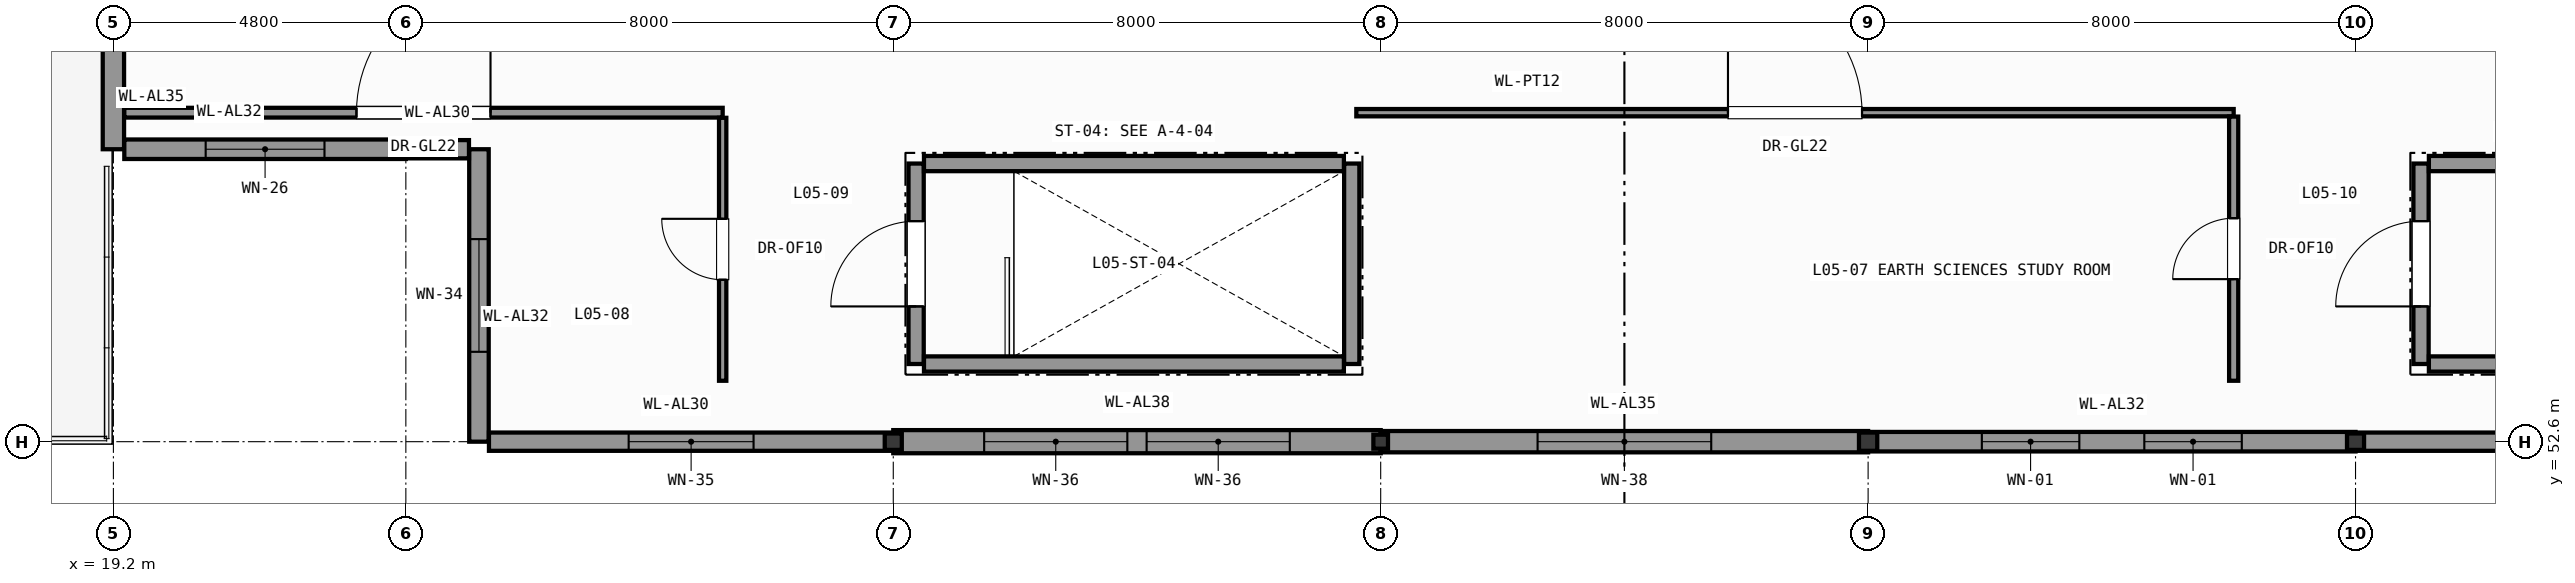
"""IFC4 building model, lengths in metres.
Left out: names, types, materials, properties, quantities, classifications, styles, units other than length and angle.
Written with IfcOpenShell. Run it as: python <this file> out.ifc"""

import sys

from ifc_helpers import new_model, si_unit, direction, frame, frame_2d, origin, origin_2d, place, context, subcontext, project, spatial, rectangle, i_section, extrude, element, fill, save


model = new_model("IFC4")
c1 = context("Model", 3, precision=1e-05, world=origin(), true_north=direction((0.0, 1.0)))
c2 = subcontext(c1, "Body", "Model", "MODEL_VIEW")
j1 = project(units=[si_unit("LENGTHUNIT", "METRE"), si_unit("PLANEANGLEUNIT", "RADIAN")], contexts=[c1])
p1 = place(None, origin())
s1 = spatial("IfcSite", under=j1, at=p1, CompositionType="ELEMENT")
p2 = place(p1, origin())
s2 = spatial("IfcBuilding", under=s1, at=p2, CompositionType="ELEMENT")
p3 = place(p2, frame((0.0, 0.0, 22.2)))
s3 = spatial("IfcBuildingStorey", under=s2, at=p3, CompositionType="ELEMENT", Elevation=22.2)
p4 = place(p3, frame((32.0, 52.6, 0.0), z_axis=(0.0, 0.0, 1.0), x_axis=(1.0, 0.0, 0.0)))
e1 = element("IfcColumn", 1, at=p4, inside=s3, PredefinedType="COLUMN", context=c2, shape_type="SweptSolid", body=[
    extrude(i_section(OverallWidth=0.28, OverallDepth=0.27, WebThickness=0.008, FlangeThickness=0.013, FilletRadius=0.024, at=origin_2d()), origin(), (0.0, 0.0, 1.0), 4.2),
])
p5 = place(p3, frame((40.0, 52.6, 0.0), z_axis=(0.0, 0.0, 1.0), x_axis=(1.0, 0.0, 0.0)))
e2 = element("IfcColumn", 2, at=p5, inside=s3, PredefinedType="COLUMN", context=c2, shape_type="SweptSolid", body=[
    extrude(i_section(OverallWidth=0.24, OverallDepth=0.23, WebThickness=0.008, FlangeThickness=0.012, FilletRadius=0.021, at=origin_2d()), origin(), (0.0, 0.0, 1.0), 4.2),
])
p6 = place(p3, frame((48.0, 52.6, 0.0), z_axis=(0.0, 0.0, 1.0), x_axis=(1.0, 0.0, 0.0)))
e3 = element("IfcColumn", 3, at=p6, inside=s3, PredefinedType="COLUMN", context=c2, shape_type="SweptSolid", body=[
    extrude(i_section(OverallWidth=0.3, OverallDepth=0.3, WebThickness=0.011, FlangeThickness=0.019, FilletRadius=0.027, at=origin_2d()), origin(), (0.0, 0.0, 1.0), 4.2),
])
p7 = place(p3, frame((56.0, 52.6, 0.0), z_axis=(0.0, 0.0, 1.0), x_axis=(1.0, 0.0, 0.0)))
e4 = element("IfcColumn", 4, at=p7, inside=s3, PredefinedType="COLUMN", context=c2, shape_type="SweptSolid", body=[
    extrude(i_section(OverallWidth=0.28, OverallDepth=0.27, WebThickness=0.008, FlangeThickness=0.013, FilletRadius=0.024, at=origin_2d()), origin(), (0.0, 0.0, 1.0), 4.2),
])
p8 = place(p3, frame((25.2, 52.6, 0.0), z_axis=(0.0, 0.0, 1.0), x_axis=(0.0, 1.0, 0.0)))
e5 = element("IfcWall", 5, at=p8, inside=s3, PredefinedType="SOLIDWALL", context=c2, shape_type="SweptSolid", body=[
    extrude(rectangle(XDim=4.8, YDim=0.32, at=frame_2d((2.4, 0.0))), origin(), (0.0, 0.0, 1.0), 3.98),
])
p9 = place(p8, frame((1.475, 0.0, 0.95)))
e6 = element("IfcOpeningElement", 6, at=p9, cuts=e5, PredefinedType="OPENING", context=c2, shape_type="SweptSolid", body=[
    extrude(rectangle(XDim=1.85, YDim=2.63, at=frame_2d((0.925, 1.315))), frame((0.0, 0.17, 0.0), z_axis=(0.0, -1.0, 0.0), x_axis=(1.0, 0.0, 0.0)), (0.0, 0.0, 1.0), 0.34),
])
p10 = place(p3, frame((32.0, 52.6, 0.0), z_axis=(0.0, 0.0, 1.0), x_axis=(-1.0, 0.0, 0.0)))
e7 = element("IfcWall", 7, at=p10, inside=s3, PredefinedType="SOLIDWALL", context=c2, shape_type="SweptSolid", body=[
    extrude(rectangle(XDim=6.636, YDim=0.3, at=frame_2d((3.318, 0.0))), origin(), (0.0, 0.0, 1.0), 3.98),
])
p11 = place(p10, frame((2.293, 0.0, 0.95)))
e8 = element("IfcOpeningElement", 8, at=p11, cuts=e7, PredefinedType="OPENING", context=c2, shape_type="SweptSolid", body=[
    extrude(rectangle(XDim=2.05, YDim=2.63, at=frame_2d((1.025, 1.315))), frame((0.0, 0.16, 0.0), z_axis=(0.0, -1.0, 0.0), x_axis=(1.0, 0.0, 0.0)), (0.0, 0.0, 1.0), 0.32),
])
p12 = place(p3, frame((40.0, 52.6, 0.0), z_axis=(0.0, 0.0, 1.0), x_axis=(-1.0, 0.0, 0.0)))
e9 = element("IfcWall", 9, at=p12, inside=s3, PredefinedType="SOLIDWALL", context=c2, shape_type="SweptSolid", body=[
    extrude(rectangle(XDim=8.0, YDim=0.38, at=frame_2d((4.0, 0.0))), origin(), (0.0, 0.0, 1.0), 3.755),
])
p13 = place(p12, frame((1.492, 0.0, 0.95)))
e10 = element("IfcOpeningElement", 10, at=p13, cuts=e9, PredefinedType="OPENING", context=c2, shape_type="SweptSolid", body=[
    extrude(rectangle(XDim=2.35, YDim=2.4, at=frame_2d((1.175, 1.2))), frame((0.0, 0.2, 0.0), z_axis=(0.0, -1.0, 0.0), x_axis=(1.0, 0.0, 0.0)), (0.0, 0.0, 1.0), 0.4),
])
p14 = place(p12, frame((4.158, 0.0, 0.95)))
e11 = element("IfcOpeningElement", 11, at=p14, cuts=e9, PredefinedType="OPENING", context=c2, shape_type="SweptSolid", body=[
    extrude(rectangle(XDim=2.35, YDim=2.4, at=frame_2d((1.175, 1.2))), frame((0.0, 0.2, 0.0), z_axis=(0.0, -1.0, 0.0), x_axis=(1.0, 0.0, 0.0)), (0.0, 0.0, 1.0), 0.4),
])
p15 = place(p3, frame((48.0, 52.6, 0.0), z_axis=(0.0, 0.0, 1.0), x_axis=(-1.0, 0.0, 0.0)))
e12 = element("IfcWall", 12, at=p15, inside=s3, PredefinedType="SOLIDWALL", context=c2, shape_type="SweptSolid", body=[
    extrude(rectangle(XDim=8.0, YDim=0.35, at=frame_2d((4.0, 0.0))), origin(), (0.0, 0.0, 1.0), 3.685),
])
p16 = place(p15, frame((2.575, 0.0, 0.95)))
e13 = element("IfcOpeningElement", 13, at=p16, cuts=e12, PredefinedType="OPENING", context=c2, shape_type="SweptSolid", body=[
    extrude(rectangle(XDim=2.85, YDim=2.34, at=frame_2d((1.425, 1.17))), frame((0.0, 0.185, 0.0), z_axis=(0.0, -1.0, 0.0), x_axis=(1.0, 0.0, 0.0)), (0.0, 0.0, 1.0), 0.37),
])
p17 = place(p3, frame((56.0, 52.6, 0.0), z_axis=(0.0, 0.0, 1.0), x_axis=(-1.0, 0.0, 0.0)))
e14 = element("IfcWall", 14, at=p17, inside=s3, PredefinedType="SOLIDWALL", context=c2, shape_type="SweptSolid", body=[
    extrude(rectangle(XDim=8.0, YDim=0.32, at=frame_2d((4.0, 0.0))), origin(), (0.0, 0.0, 1.0), 3.625),
])
p18 = place(p17, frame((1.867, 0.0, 0.95)))
e15 = element("IfcOpeningElement", 15, at=p18, cuts=e14, PredefinedType="OPENING", context=c2, shape_type="SweptSolid", body=[
    extrude(rectangle(XDim=1.6, YDim=2.27, at=frame_2d((0.8, 1.135))), frame((0.0, 0.17, 0.0), z_axis=(0.0, -1.0, 0.0), x_axis=(1.0, 0.0, 0.0)), (0.0, 0.0, 1.0), 0.34),
])
p19 = place(p17, frame((4.533, 0.0, 0.95)))
e16 = element("IfcOpeningElement", 16, at=p19, cuts=e14, PredefinedType="OPENING", context=c2, shape_type="SweptSolid", body=[
    extrude(rectangle(XDim=1.6, YDim=2.27, at=frame_2d((0.8, 1.135))), frame((0.0, 0.17, 0.0), z_axis=(0.0, -1.0, 0.0), x_axis=(1.0, 0.0, 0.0)), (0.0, 0.0, 1.0), 0.34),
])
p20 = place(p3, frame((70.0, 52.6, 0.0), z_axis=(0.0, 0.0, 1.0), x_axis=(-1.0, 0.0, 0.0)))
e17 = element("IfcWall", 17, at=p20, inside=s3, PredefinedType="SOLIDWALL", context=c2, shape_type="SweptSolid", body=[
    extrude(rectangle(XDim=14.0, YDim=0.3, at=frame_2d((7.0, 0.0))), origin(), (0.0, 0.0, 1.0), 3.98),
])
p21 = place(p20, frame((3.667, 0.0, 0.95)))
e18 = element("IfcOpeningElement", 18, at=p21, cuts=e17, PredefinedType="OPENING", context=c2, shape_type="SweptSolid", body=[
    extrude(rectangle(XDim=2.0, YDim=2.63, at=frame_2d((1.0, 1.315))), frame((0.0, 0.16, 0.0), z_axis=(0.0, -1.0, 0.0), x_axis=(1.0, 0.0, 0.0)), (0.0, 0.0, 1.0), 0.32),
])
p22 = place(p20, frame((8.333, 0.0, 0.95)))
e19 = element("IfcOpeningElement", 19, at=p22, cuts=e17, PredefinedType="OPENING", context=c2, shape_type="SweptSolid", body=[
    extrude(rectangle(XDim=2.0, YDim=2.63, at=frame_2d((1.0, 1.315))), frame((0.0, 0.16, 0.0), z_axis=(0.0, -1.0, 0.0), x_axis=(1.0, 0.0, 0.0)), (0.0, 0.0, 1.0), 0.32),
])
p23 = place(p3, frame((19.2, 57.4, 0.0), z_axis=(0.0, 0.0, 1.0), x_axis=(0.0, 1.0, 0.0)))
e20 = element("IfcWall", 20, at=p23, inside=s3, PredefinedType="SOLIDWALL", context=c2, shape_type="SweptSolid", body=[
    extrude(rectangle(XDim=2.2, YDim=0.35, at=frame_2d((1.1, 0.0))), origin(), (0.0, 0.0, 1.0), 3.98),
])
p24 = place(p3, frame((24.0, 57.4, 0.0), z_axis=(0.0, 0.0, 1.0), x_axis=(-1.0, 0.0, 0.0)))
e21 = element("IfcWall", 21, at=p24, inside=s3, PredefinedType="SOLIDWALL", context=c2, shape_type="SweptSolid", body=[
    extrude(rectangle(XDim=4.621, YDim=0.32, at=frame_2d((2.311, 0.0))), origin(), (0.0, 0.0, 1.0), 3.98),
])
p25 = place(p24, frame((1.335, 0.0, 0.95)))
e22 = element("IfcOpeningElement", 22, at=p25, cuts=e21, PredefinedType="OPENING", context=c2, shape_type="SweptSolid", body=[
    extrude(rectangle(XDim=1.95, YDim=2.55, at=frame_2d((0.975, 1.275))), frame((0.0, 0.17, 0.0), z_axis=(0.0, -1.0, 0.0), x_axis=(1.0, 0.0, 0.0)), (0.0, 0.0, 1.0), 0.34),
])
p26 = place(p3, frame((25.036, 57.4, 0.0), z_axis=(0.0, 0.0, 1.0), x_axis=(-1.0, 0.0, 0.0)))
e23 = element("IfcWall", 23, at=p26, inside=s3, PredefinedType="SOLIDWALL", context=c2, shape_type="SweptSolid", body=[
    extrude(rectangle(XDim=1.036, YDim=0.3, at=frame_2d((0.518, 0.0))), origin(), (0.0, 0.0, 1.0), 3.98),
])
p27 = place(p3, frame((57.075, 53.875, 0.0), z_axis=(0.0, 0.0, 1.0), x_axis=(0.0, 1.0, 0.0)))
e24 = element("IfcWall", 24, at=p27, inside=s3, PredefinedType="SHEAR", context=c2, shape_type="SweptSolid", body=[
    extrude(rectangle(XDim=3.29, YDim=0.25, at=frame_2d((1.645, 0.0))), origin(), (0.0, 0.0, 1.0), 3.98),
])
p28 = place(p27, frame((0.945, 0.0, 0.0)))
e25 = element("IfcOpeningElement", 25, at=p28, cuts=e24, PredefinedType="OPENING", context=c2, shape_type="SweptSolid", body=[
    extrude(rectangle(XDim=1.4, YDim=2.2, at=frame_2d((0.7, 1.1))), frame((0.0, 0.135, 0.0), z_axis=(0.0, -1.0, 0.0), x_axis=(1.0, 0.0, 0.0)), (0.0, 0.0, 1.0), 0.27),
])
for number, where, z_axis, x_axis in (
    (26, (57.204, 53.875, 0.0), (0.0, 0.0, 1.0), (1.0, 0.0, 0.0)),
    (27, (57.204, 57.165, 0.0), (0.0, 0.0, 1.0), (1.0, 0.0, 0.0)),
):
    element("IfcWall", number, at=place(p3, frame(where, z_axis=z_axis, x_axis=x_axis)), inside=s3, PredefinedType="SHEAR", context=c2, shape_type="SweptSolid", body=[
        extrude(rectangle(XDim=7.192, YDim=0.25, at=frame_2d((3.596, 0.0))), origin(), (0.0, 0.0, 1.0), 3.98),
    ])
p29 = place(p3, frame((32.375, 53.875, 0.0), z_axis=(0.0, 0.0, 1.0), x_axis=(0.0, 1.0, 0.0)))
e28 = element("IfcWall", 28, at=p29, inside=s3, PredefinedType="SHEAR", context=c2, shape_type="SweptSolid", body=[
    extrude(rectangle(XDim=3.29, YDim=0.25, at=frame_2d((1.645, 0.0))), origin(), (0.0, 0.0, 1.0), 3.98),
])
p30 = place(p29, frame((0.945, 0.0, 0.0)))
e29 = element("IfcOpeningElement", 29, at=p30, cuts=e28, PredefinedType="OPENING", context=c2, shape_type="SweptSolid", body=[
    extrude(rectangle(XDim=1.4, YDim=2.2, at=frame_2d((0.7, 1.1))), frame((0.0, 0.135, 0.0), z_axis=(0.0, -1.0, 0.0), x_axis=(1.0, 0.0, 0.0)), (0.0, 0.0, 1.0), 0.27),
])
p31 = place(p3, frame((39.525, 53.875, 0.0), z_axis=(0.0, 0.0, 1.0), x_axis=(0.0, 1.0, 0.0)))
e30 = element("IfcWall", 30, at=p31, inside=s3, PredefinedType="SHEAR", context=c2, shape_type="SweptSolid", body=[
    extrude(rectangle(XDim=3.29, YDim=0.25, at=frame_2d((1.645, 0.0))), origin(), (0.0, 0.0, 1.0), 3.98),
])
for number, where, z_axis, x_axis in (
    (31, (32.504, 53.875, 0.0), (0.0, 0.0, 1.0), (1.0, 0.0, 0.0)),
    (32, (32.504, 57.165, 0.0), (0.0, 0.0, 1.0), (1.0, 0.0, 0.0)),
):
    element("IfcWall", number, at=place(p3, frame(where, z_axis=z_axis, x_axis=x_axis)), inside=s3, PredefinedType="SHEAR", context=c2, shape_type="SweptSolid", body=[
        extrude(rectangle(XDim=6.892, YDim=0.25, at=frame_2d((3.446, 0.0))), origin(), (0.0, 0.0, 1.0), 3.98),
    ])
p32 = place(p3, frame((39.6, 58.0, 0.0), z_axis=(0.0, 0.0, 1.0), x_axis=(1.0, 0.0, 0.0)))
e33 = element("IfcWall", 33, at=p32, inside=s3, PredefinedType="PARTITIONING", context=c2, shape_type="SweptSolid", body=[
    extrude(rectangle(XDim=14.4, YDim=0.12, at=frame_2d((7.2, 0.0))), origin(), (0.0, 0.0, 1.0), 3.98),
])
p33 = place(p32, frame((6.1, 0.0, 0.0)))
e34 = element("IfcOpeningElement", 34, at=p33, cuts=e33, PredefinedType="OPENING", context=c2, shape_type="SweptSolid", body=[
    extrude(rectangle(XDim=2.2, YDim=2.6, at=frame_2d((1.1, 1.3))), frame((0.0, 0.07, 0.0), z_axis=(0.0, -1.0, 0.0), x_axis=(1.0, 0.0, 0.0)), (0.0, 0.0, 1.0), 0.14),
])
p34 = place(p3, frame((19.379, 58.0, 0.0), z_axis=(0.0, 0.0, 1.0), x_axis=(1.0, 0.0, 0.0)))
e35 = element("IfcWall", 35, at=p34, inside=s3, PredefinedType="PARTITIONING", context=c2, shape_type="SweptSolid", body=[
    extrude(rectangle(XDim=9.821, YDim=0.16, at=frame_2d((4.911, 0.0))), origin(), (0.0, 0.0, 1.0), 3.98),
])
p35 = place(p34, frame((3.811, 0.0, 0.0)))
e36 = element("IfcOpeningElement", 36, at=p35, cuts=e35, PredefinedType="OPENING", context=c2, shape_type="SweptSolid", body=[
    extrude(rectangle(XDim=2.2, YDim=2.6, at=frame_2d((1.1, 1.3))), frame((0.0, 0.09, 0.0), z_axis=(0.0, -1.0, 0.0), x_axis=(1.0, 0.0, 0.0)), (0.0, 0.0, 1.0), 0.18),
])
p36 = place(p3, frame((54.0, 53.6, 0.0), z_axis=(0.0, 0.0, 1.0), x_axis=(0.0, 1.0, 0.0)))
e37 = element("IfcWall", 37, at=p36, inside=s3, PredefinedType="PARTITIONING", context=c2, shape_type="SweptSolid", body=[
    extrude(rectangle(XDim=4.336, YDim=0.15, at=frame_2d((2.168, 0.0))), origin(), (0.0, 0.0, 1.0), 3.98),
])
p37 = place(p36, frame((1.668, 0.0, 0.0)))
e38 = element("IfcOpeningElement", 38, at=p37, cuts=e37, PredefinedType="OPENING", context=c2, shape_type="SweptSolid", body=[
    extrude(rectangle(XDim=1.0, YDim=2.15, at=frame_2d((0.5, 1.075))), frame((0.0, 0.085, 0.0), z_axis=(0.0, -1.0, 0.0), x_axis=(1.0, 0.0, 0.0)), (0.0, 0.0, 1.0), 0.17),
])
p38 = place(p3, frame((29.2, 53.6, 0.0), z_axis=(0.0, 0.0, 1.0), x_axis=(0.0, 1.0, 0.0)))
e39 = element("IfcWall", 39, at=p38, inside=s3, PredefinedType="PARTITIONING", context=c2, shape_type="SweptSolid", body=[
    extrude(rectangle(XDim=4.316, YDim=0.12, at=frame_2d((2.158, 0.0))), origin(), (0.0, 0.0, 1.0), 3.98),
])
p39 = place(p38, frame((1.658, 0.0, 0.0)))
e40 = element("IfcOpeningElement", 40, at=p39, cuts=e39, PredefinedType="OPENING", context=c2, shape_type="SweptSolid", body=[
    extrude(rectangle(XDim=1.0, YDim=2.15, at=frame_2d((0.5, 1.075))), frame((0.0, 0.07, 0.0), z_axis=(0.0, -1.0, 0.0), x_axis=(1.0, 0.0, 0.0)), (0.0, 0.0, 1.0), 0.14),
])
p40 = place(p9, origin())
e41 = element("IfcWindow", 41, at=p40, inside=s3, PartitioningType="SINGLE_PANEL", PredefinedType="WINDOW", context=c2, shape_type="SweptSolid", body=[
    extrude(rectangle(XDim=1.85, YDim=2.63, at=frame_2d((0.925, 1.315))), frame((0.0, 0.03, 0.0), z_axis=(0.0, -1.0, 0.0), x_axis=(1.0, 0.0, 0.0)), (0.0, 0.0, 1.0), 0.06),
])
fill(e6, e41)
p41 = place(p11, origin())
e42 = element("IfcWindow", 42, at=p41, inside=s3, PartitioningType="SINGLE_PANEL", PredefinedType="WINDOW", context=c2, shape_type="SweptSolid", body=[
    extrude(rectangle(XDim=2.05, YDim=2.63, at=frame_2d((1.025, 1.315))), frame((0.0, 0.03, 0.0), z_axis=(0.0, -1.0, 0.0), x_axis=(1.0, 0.0, 0.0)), (0.0, 0.0, 1.0), 0.06),
])
fill(e8, e42)
p42 = place(p13, origin())
e43 = element("IfcWindow", 43, at=p42, inside=s3, PartitioningType="SINGLE_PANEL", PredefinedType="WINDOW", context=c2, shape_type="SweptSolid", body=[
    extrude(rectangle(XDim=2.35, YDim=2.4, at=frame_2d((1.175, 1.2))), frame((0.0, 0.03, 0.0), z_axis=(0.0, -1.0, 0.0), x_axis=(1.0, 0.0, 0.0)), (0.0, 0.0, 1.0), 0.06),
])
fill(e10, e43)
p43 = place(p14, origin())
e44 = element("IfcWindow", 44, at=p43, inside=s3, PartitioningType="SINGLE_PANEL", PredefinedType="WINDOW", context=c2, shape_type="SweptSolid", body=[
    extrude(rectangle(XDim=2.35, YDim=2.4, at=frame_2d((1.175, 1.2))), frame((0.0, 0.03, 0.0), z_axis=(0.0, -1.0, 0.0), x_axis=(1.0, 0.0, 0.0)), (0.0, 0.0, 1.0), 0.06),
])
fill(e11, e44)
p44 = place(p16, origin())
e45 = element("IfcWindow", 45, at=p44, inside=s3, PartitioningType="SINGLE_PANEL", PredefinedType="WINDOW", context=c2, shape_type="SweptSolid", body=[
    extrude(rectangle(XDim=2.85, YDim=2.34, at=frame_2d((1.425, 1.17))), frame((0.0, 0.03, 0.0), z_axis=(0.0, -1.0, 0.0), x_axis=(1.0, 0.0, 0.0)), (0.0, 0.0, 1.0), 0.06),
])
fill(e13, e45)
p45 = place(p18, origin())
e46 = element("IfcWindow", 46, at=p45, inside=s3, PartitioningType="SINGLE_PANEL", PredefinedType="WINDOW", context=c2, shape_type="SweptSolid", body=[
    extrude(rectangle(XDim=1.6, YDim=2.27, at=frame_2d((0.8, 1.135))), frame((0.0, 0.03, 0.0), z_axis=(0.0, -1.0, 0.0), x_axis=(1.0, 0.0, 0.0)), (0.0, 0.0, 1.0), 0.06),
])
fill(e15, e46)
p46 = place(p19, origin())
e47 = element("IfcWindow", 47, at=p46, inside=s3, PartitioningType="SINGLE_PANEL", PredefinedType="WINDOW", context=c2, shape_type="SweptSolid", body=[
    extrude(rectangle(XDim=1.6, YDim=2.27, at=frame_2d((0.8, 1.135))), frame((0.0, 0.03, 0.0), z_axis=(0.0, -1.0, 0.0), x_axis=(1.0, 0.0, 0.0)), (0.0, 0.0, 1.0), 0.06),
])
fill(e16, e47)
p47 = place(p25, origin())
e48 = element("IfcWindow", 48, at=p47, inside=s3, PartitioningType="SINGLE_PANEL", PredefinedType="WINDOW", context=c2, shape_type="SweptSolid", body=[
    extrude(rectangle(XDim=1.95, YDim=2.55, at=frame_2d((0.975, 1.275))), frame((0.0, 0.03, 0.0), z_axis=(0.0, -1.0, 0.0), x_axis=(1.0, 0.0, 0.0)), (0.0, 0.0, 1.0), 0.06),
])
fill(e22, e48)
p48 = place(p28, origin())
e49 = element("IfcDoor", 49, at=p48, inside=s3, OperationType="SINGLE_SWING_LEFT", PredefinedType="DOOR", context=c2, shape_type="SweptSolid", body=[
    extrude(rectangle(XDim=1.4, YDim=2.2, at=frame_2d((0.7, 1.1))), frame((0.0, 0.025, 0.0), z_axis=(0.0, -1.0, 0.0), x_axis=(1.0, 0.0, 0.0)), (0.0, 0.0, 1.0), 0.05),
])
fill(e25, e49)
p49 = place(p30, origin())
e50 = element("IfcDoor", 50, at=p49, inside=s3, OperationType="SINGLE_SWING_LEFT", PredefinedType="DOOR", context=c2, shape_type="SweptSolid", body=[
    extrude(rectangle(XDim=1.4, YDim=2.2, at=frame_2d((0.7, 1.1))), frame((0.0, 0.025, 0.0), z_axis=(0.0, -1.0, 0.0), x_axis=(1.0, 0.0, 0.0)), (0.0, 0.0, 1.0), 0.05),
])
fill(e29, e50)
p50 = place(p33, origin())
e51 = element("IfcDoor", 51, at=p50, inside=s3, OperationType="SINGLE_SWING_LEFT", PredefinedType="DOOR", context=c2, shape_type="SweptSolid", body=[
    extrude(rectangle(XDim=2.2, YDim=2.6, at=frame_2d((1.1, 1.3))), frame((0.0, 0.025, 0.0), z_axis=(0.0, -1.0, 0.0), x_axis=(1.0, 0.0, 0.0)), (0.0, 0.0, 1.0), 0.05),
])
fill(e34, e51)
p51 = place(p35, origin())
e52 = element("IfcDoor", 52, at=p51, inside=s3, OperationType="SINGLE_SWING_RIGHT", PredefinedType="DOOR", context=c2, shape_type="SweptSolid", body=[
    extrude(rectangle(XDim=2.2, YDim=2.6, at=frame_2d((1.1, 1.3))), frame((0.0, 0.025, 0.0), z_axis=(0.0, -1.0, 0.0), x_axis=(1.0, 0.0, 0.0)), (0.0, 0.0, 1.0), 0.05),
])
fill(e36, e52)
p52 = place(p37, origin())
e53 = element("IfcDoor", 53, at=p52, inside=s3, OperationType="SINGLE_SWING_LEFT", PredefinedType="DOOR", context=c2, shape_type="SweptSolid", body=[
    extrude(rectangle(XDim=1.0, YDim=2.15, at=frame_2d((0.5, 1.075))), frame((0.0, 0.025, 0.0), z_axis=(0.0, -1.0, 0.0), x_axis=(1.0, 0.0, 0.0)), (0.0, 0.0, 1.0), 0.05),
])
fill(e38, e53)
p53 = place(p39, origin())
e54 = element("IfcDoor", 54, at=p53, inside=s3, OperationType="SINGLE_SWING_RIGHT", PredefinedType="DOOR", context=c2, shape_type="SweptSolid", body=[
    extrude(rectangle(XDim=1.0, YDim=2.15, at=frame_2d((0.5, 1.075))), frame((0.0, 0.025, 0.0), z_axis=(0.0, -1.0, 0.0), x_axis=(1.0, 0.0, 0.0)), (0.0, 0.0, 1.0), 0.05),
])
fill(e40, e54)
save(model, sys.argv[1])
